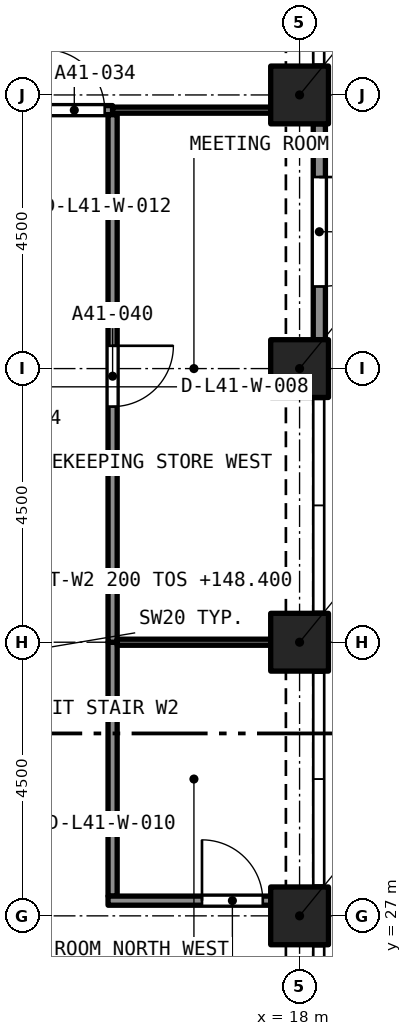
"""IFC4 building model, lengths in metres.
Left out: names, types, materials, properties, quantities, classifications, styles, units other than length and angle.
Written with IfcOpenShell. Run it as: python <this file> out.ifc"""

import sys

from ifc_helpers import new_model, si_unit, direction, frame, frame_2d, origin, origin_2d, place, context, subcontext, project, spatial, rectangle, extrude, element, fill, save


model = new_model("IFC4")
c1 = context("Model", 3, precision=1e-05, world=origin(), true_north=direction((0.0, 1.0)))
c2 = subcontext(c1, "Body", "Model", "MODEL_VIEW")
j1 = project(units=[si_unit("LENGTHUNIT", "METRE"), si_unit("PLANEANGLEUNIT", "RADIAN")], contexts=[c1])
p1 = place(None, origin())
s1 = spatial("IfcSite", under=j1, at=p1, CompositionType="ELEMENT")
p2 = place(p1, origin())
s2 = spatial("IfcBuilding", under=s1, at=p2, CompositionType="ELEMENT")
p3 = place(p2, frame((0.0, 0.0, 146.2)))
s3 = spatial("IfcBuildingStorey", under=s2, at=p3, CompositionType="ELEMENT", Elevation=146.2)
for number, where, z_axis, x_axis in (
    (1, (18.0, 27.0, 0.0), (0.0, 0.0, 1.0), (1.0, 0.0, 0.0)),
    (2, (18.0, 31.5, 0.0), (0.0, 0.0, 1.0), (1.0, 0.0, 0.0)),
    (3, (18.0, 36.0, 0.0), (0.0, 0.0, 1.0), (1.0, 0.0, 0.0)),
    (4, (18.0, 40.5, 0.0), (0.0, 0.0, 1.0), (1.0, 0.0, 0.0)),
):
    element("IfcColumn", number, at=place(p3, frame(where, z_axis=z_axis, x_axis=x_axis)), inside=s3, PredefinedType="COLUMN", context=c2, shape_type="SweptSolid", body=[
        extrude(rectangle(XDim=0.95, YDim=0.95, at=origin_2d()), origin(), (0.0, 0.0, 1.0), 4.4),
    ])
p4 = place(p3, frame((18.325, 40.025, 0.0), z_axis=(0.0, 0.0, 1.0), x_axis=(0.0, -1.0, 0.0)))
e5 = element("IfcWall", 5, at=p4, inside=s3, PredefinedType="SOLIDWALL", context=c2, shape_type="SweptSolid", body=[
    extrude(rectangle(XDim=3.55, YDim=0.2, at=frame_2d((1.775, 0.0))), origin(), (0.0, 0.0, 1.0), 4.4),
])
p5 = place(p4, frame((0.875, 0.0, 0.0)))
e6 = element("IfcOpeningElement", 6, at=p5, cuts=e5, PredefinedType="OPENING", context=c2, shape_type="SweptSolid", body=[
    extrude(rectangle(XDim=1.8, YDim=2.4, at=frame_2d((0.9, 1.2))), frame((0.0, 0.11, 0.0), z_axis=(0.0, -1.0, 0.0), x_axis=(1.0, 0.0, 0.0)), (0.0, 0.0, 1.0), 0.22),
])
p6 = place(p3, frame((13.25, 40.25, 0.0), z_axis=(0.0, 0.0, 1.0), x_axis=(1.0, 0.0, 0.0)))
e7 = element("IfcWall", 7, at=p6, inside=s3, PredefinedType="PARTITIONING", context=c2, shape_type="SweptSolid", body=[
    extrude(rectangle(XDim=1.675, YDim=0.15, at=frame_2d((0.837, 0.0))), origin(), (0.0, 0.0, 1.0), 4.1),
])
p7 = place(p6, frame((0.545, 0.0, 0.0)))
e8 = element("IfcOpeningElement", 8, at=p7, cuts=e7, PredefinedType="OPENING", context=c2, shape_type="SweptSolid", body=[
    extrude(rectangle(XDim=1.0, YDim=2.1, at=frame_2d((0.5, 1.05))), frame((0.0, 0.085, 0.0), z_axis=(0.0, -1.0, 0.0), x_axis=(1.0, 0.0, 0.0)), (0.0, 0.0, 1.0), 0.17),
])
p8 = place(p3, frame((14.925, 40.25, 0.0), z_axis=(0.0, 0.0, 1.0), x_axis=(1.0, 0.0, 0.0)))
e9 = element("IfcWall", 9, at=p8, inside=s3, PredefinedType="PARTITIONING", context=c2, shape_type="SweptSolid", body=[
    extrude(rectangle(XDim=2.6, YDim=0.1, at=frame_2d((1.3, 0.0))), origin(), (0.0, 0.0, 1.0), 4.1),
])
p9 = place(p3, frame((14.925, 27.325, 0.0), z_axis=(0.0, 0.0, 1.0), x_axis=(0.0, 1.0, 0.0)))
e10 = element("IfcWall", 10, at=p9, inside=s3, PredefinedType="PARTITIONING", context=c2, shape_type="SweptSolid", body=[
    extrude(rectangle(XDim=4.175, YDim=0.15, at=frame_2d((2.087, 0.0))), origin(), (0.0, 0.0, 1.0), 4.1),
])
p10 = place(p3, frame((14.85, 27.25, 0.0), z_axis=(0.0, 0.0, 1.0), x_axis=(1.0, 0.0, 0.0)))
e11 = element("IfcWall", 11, at=p10, inside=s3, PredefinedType="PARTITIONING", context=c2, shape_type="SweptSolid", body=[
    extrude(rectangle(XDim=2.675, YDim=0.15, at=frame_2d((1.337, 0.0))), origin(), (0.0, 0.0, 1.0), 4.1),
])
p11 = place(p10, frame((1.545, 0.0, 0.0)))
e12 = element("IfcOpeningElement", 12, at=p11, cuts=e11, PredefinedType="OPENING", context=c2, shape_type="SweptSolid", body=[
    extrude(rectangle(XDim=1.0, YDim=2.1, at=frame_2d((0.5, 1.05))), frame((0.0, 0.085, 0.0), z_axis=(0.0, -1.0, 0.0), x_axis=(1.0, 0.0, 0.0)), (0.0, 0.0, 1.0), 0.17),
])
p12 = place(p3, frame((14.925, 40.175, 0.0), z_axis=(0.0, 0.0, 1.0), x_axis=(0.0, -1.0, 0.0)))
e13 = element("IfcWall", 13, at=p12, inside=s3, PredefinedType="PARTITIONING", context=c2, shape_type="SweptSolid", body=[
    extrude(rectangle(XDim=8.675, YDim=0.15, at=frame_2d((4.337, 0.0))), origin(), (0.0, 0.0, 1.0), 4.1),
])
p13 = place(p12, frame((3.8, 0.0, 0.0)))
e14 = element("IfcOpeningElement", 14, at=p13, cuts=e13, PredefinedType="OPENING", context=c2, shape_type="SweptSolid", body=[
    extrude(rectangle(XDim=1.0, YDim=2.1, at=frame_2d((0.5, 1.05))), frame((0.0, 0.085, 0.0), z_axis=(0.0, -1.0, 0.0), x_axis=(1.0, 0.0, 0.0)), (0.0, 0.0, 1.0), 0.17),
])
p14 = place(p3, frame((15.0, 31.5, 0.0), z_axis=(0.0, 0.0, 1.0), x_axis=(1.0, 0.0, 0.0)))
e15 = element("IfcWall", 15, at=p14, inside=s3, PredefinedType="PARTITIONING", context=c2, shape_type="SweptSolid", body=[
    extrude(rectangle(XDim=2.525, YDim=0.1, at=frame_2d((1.262, 0.0))), origin(), (0.0, 0.0, 1.0), 4.1),
])
p15 = place(p5, origin())
e16 = element("IfcDoor", 16, at=p15, inside=s3, OperationType="DOUBLE_DOOR_SINGLE_SWING", PredefinedType="DOOR", context=c2, shape_type="SweptSolid", body=[
    extrude(rectangle(XDim=1.8, YDim=2.4, at=frame_2d((0.9, 1.2))), frame((0.0, 0.025, 0.0), z_axis=(0.0, -1.0, 0.0), x_axis=(1.0, 0.0, 0.0)), (0.0, 0.0, 1.0), 0.05),
])
fill(e6, e16)
p16 = place(p7, origin())
e17 = element("IfcDoor", 17, at=p16, inside=s3, OperationType="SINGLE_SWING_RIGHT", PredefinedType="DOOR", context=c2, shape_type="SweptSolid", body=[
    extrude(rectangle(XDim=1.0, YDim=2.1, at=frame_2d((0.5, 1.05))), frame((0.0, 0.025, 0.0), z_axis=(0.0, -1.0, 0.0), x_axis=(1.0, 0.0, 0.0)), (0.0, 0.0, 1.0), 0.05),
])
fill(e8, e17)
p17 = place(p11, origin())
e18 = element("IfcDoor", 18, at=p17, inside=s3, OperationType="SINGLE_SWING_RIGHT", PredefinedType="DOOR", context=c2, shape_type="SweptSolid", body=[
    extrude(rectangle(XDim=1.0, YDim=2.1, at=frame_2d((0.5, 1.05))), frame((0.0, 0.025, 0.0), z_axis=(0.0, -1.0, 0.0), x_axis=(1.0, 0.0, 0.0)), (0.0, 0.0, 1.0), 0.05),
])
fill(e12, e18)
p18 = place(p13, origin())
e19 = element("IfcDoor", 19, at=p18, inside=s3, OperationType="SINGLE_SWING_LEFT", PredefinedType="DOOR", context=c2, shape_type="SweptSolid", body=[
    extrude(rectangle(XDim=1.0, YDim=2.1, at=frame_2d((0.5, 1.05))), frame((0.0, 0.025, 0.0), z_axis=(0.0, -1.0, 0.0), x_axis=(1.0, 0.0, 0.0)), (0.0, 0.0, 1.0), 0.05),
])
fill(e14, e19)
save(model, sys.argv[1])
